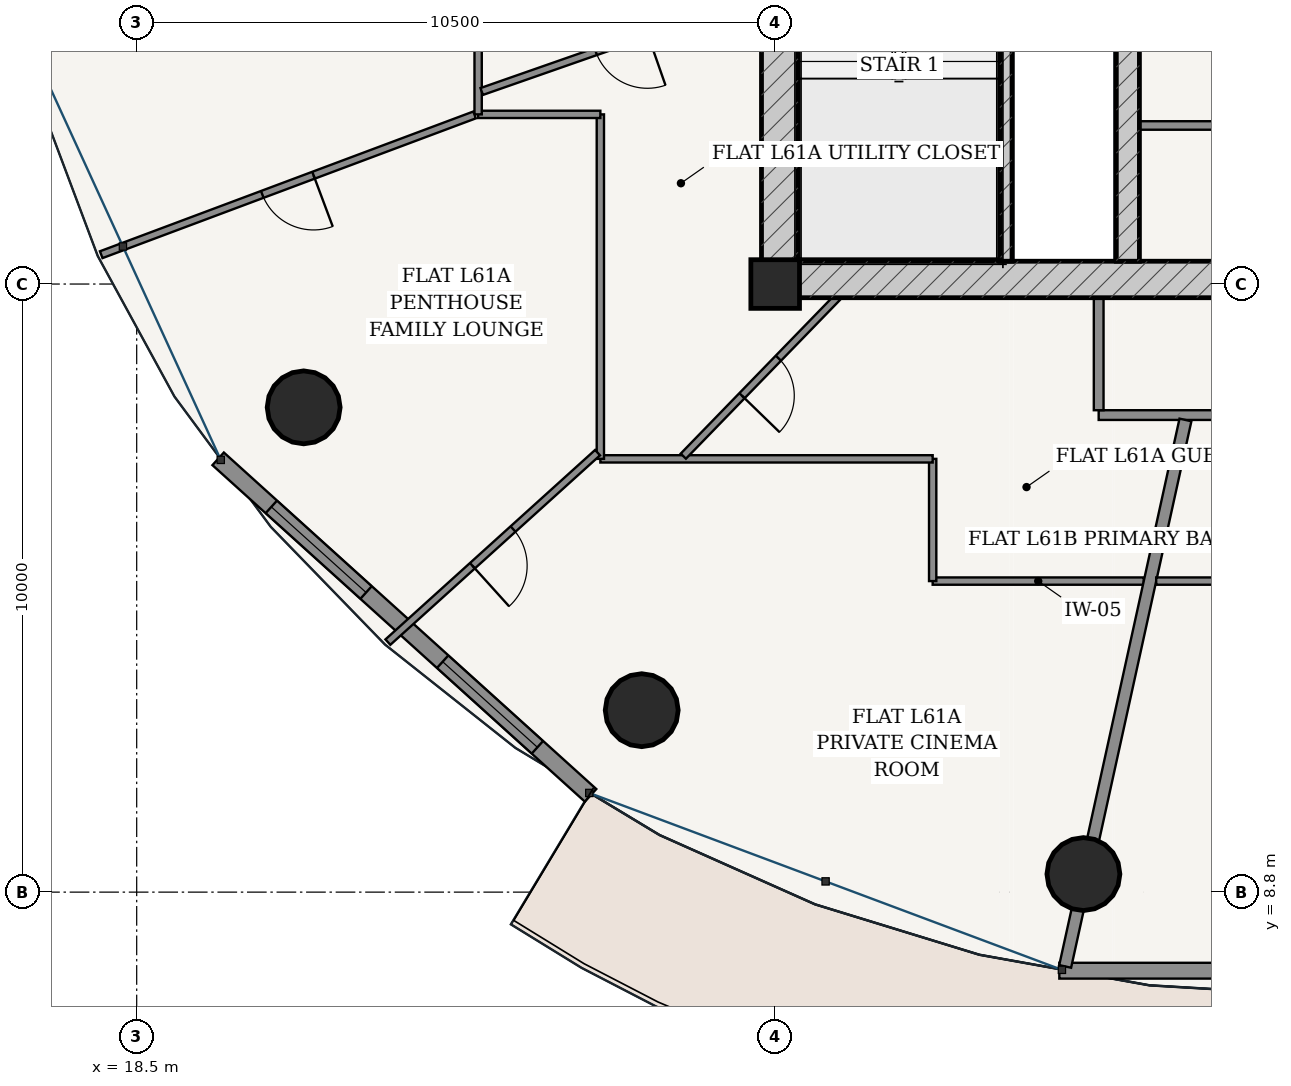
"""IFC4 building model, lengths in metres.
Left out: names, types, materials, properties, quantities, classifications, styles, units other than length and angle.
Written with IfcOpenShell. Run it as: python <this file> out.ifc"""

import sys

from ifc_helpers import new_model, si_unit, direction, frame, frame_2d, origin, origin_2d, place, context, subcontext, project, spatial, rectangle, hollow_circle, extrude, source, transform, mapped, element, fill, save


model = new_model("IFC4")
c1 = context("Model", 3, precision=1e-05, world=origin(), true_north=direction((-0.2419218956, 0.970295726276)))
c2 = subcontext(c1, "Body", "Model", "MODEL_VIEW")
j1 = project(units=[si_unit("LENGTHUNIT", "METRE"), si_unit("PLANEANGLEUNIT", "RADIAN")], contexts=[c1])
p1 = place(None, origin())
s1 = spatial("IfcSite", under=j1, at=p1, CompositionType="ELEMENT")
p2 = place(p1, origin())
s2 = spatial("IfcBuilding", under=s1, at=p2, CompositionType="ELEMENT")
p3 = place(p2, frame((0.0, 0.0, 231.9)))
s3 = spatial("IfcBuildingStorey", under=s2, at=p3, CompositionType="ELEMENT", Elevation=231.9)
p4 = place(p3, frame((29.0, 18.8, 0.0), z_axis=(0.0, 0.0, 1.0), x_axis=(1.0, 0.0, 0.0)))
e1 = element("IfcColumn", 1, at=p4, inside=s3, PredefinedType="COLUMN", context=c2, shape_type="SweptSolid", body=[
    extrude(rectangle(XDim=0.8, YDim=0.8, at=origin_2d()), origin(), (0.0, 0.0, 1.0), 3.7),
])
p5 = place(p3, frame((28.775, 18.875, 0.0), z_axis=(0.0, 0.0, 1.0), x_axis=(1.0, 0.0, 0.0)))
e2 = element("IfcWall", 2, at=p5, inside=s3, PredefinedType="SHEAR", context=c2, shape_type="SweptSolid", body=[
    extrude(rectangle(XDim=18.45, YDim=0.6, at=frame_2d((9.225, 0.0))), origin(), (0.0, 0.0, 1.0), 3.435),
])
p6 = place(p5, frame((8.8, 0.0, 0.0)))
e3 = element("IfcOpeningElement", 3, at=p6, cuts=e2, PredefinedType="OPENING", context=c2, shape_type="SweptSolid", body=[
    extrude(rectangle(XDim=0.85, YDim=2.1, at=frame_2d((0.425, 1.05))), frame((0.0, 0.31, 0.0), z_axis=(0.0, -1.0, 0.0), x_axis=(1.0, 0.0, 0.0)), (0.0, 0.0, 1.0), 0.62),
])
p7 = place(p3, frame((29.075, 19.175, 0.0), z_axis=(0.0, 0.0, 1.0), x_axis=(0.0, 1.0, 0.0)))
e4 = element("IfcWall", 4, at=p7, inside=s3, PredefinedType="SHEAR", context=c2, shape_type="SweptSolid", body=[
    extrude(rectangle(XDim=15.25, YDim=0.6, at=frame_2d((7.625, 0.0))), origin(), (0.0, 0.0, 1.0), 3.435),
])
p8 = place(p7, frame((9.875, 0.0, 0.0)))
e5 = element("IfcOpeningElement", 5, at=p8, cuts=e4, PredefinedType="OPENING", context=c2, shape_type="SweptSolid", body=[
    extrude(rectangle(XDim=1.5, YDim=2.2, at=frame_2d((0.75, 1.1))), frame((0.0, 0.31, 0.0), z_axis=(0.0, -1.0, 0.0), x_axis=(1.0, 0.0, 0.0)), (0.0, 0.0, 1.0), 0.62),
])
p9 = place(p3, frame((32.795, 19.175, 0.0), z_axis=(0.0, 0.0, 1.0), x_axis=(0.0, 1.0, 0.0)))
e6 = element("IfcWall", 6, at=p9, inside=s3, PredefinedType="SOLIDWALL", context=c2, shape_type="SweptSolid", body=[
    extrude(rectangle(XDim=7.375, YDim=0.2, at=frame_2d((3.688, 0.0))), origin(), (0.0, 0.0, 1.0), 3.435),
])
p10 = place(p3, frame((34.8, 19.175, 0.0), z_axis=(0.0, 0.0, 1.0), x_axis=(0.0, 1.0, 0.0)))
e7 = element("IfcWall", 7, at=p10, inside=s3, PredefinedType="SHEAR", context=c2, shape_type="SweptSolid", body=[
    extrude(rectangle(XDim=15.25, YDim=0.38, at=frame_2d((7.625, 0.0))), origin(), (0.0, 0.0, 1.0), 3.435),
])
p11 = place(p10, frame((7.8, 0.0, 0.0)))
e8 = element("IfcOpeningElement", 8, at=p11, cuts=e7, PredefinedType="OPENING", context=c2, shape_type="SweptSolid", body=[
    extrude(rectangle(XDim=1.05, YDim=2.15, at=frame_2d((0.525, 1.075))), frame((0.0, 0.2, 0.0), z_axis=(0.0, -1.0, 0.0), x_axis=(1.0, 0.0, 0.0)), (0.0, 0.0, 1.0), 0.4),
])
for number, where, z_axis, x_axis in (
    (9, (21.246, 16.772, 0.0), (0.0, 0.0, 1.0), (1.0, 0.0, 0.0)),
    (10, (26.805, 11.792, 0.0), (0.0, 0.0, 1.0), (1.0, 0.0, 0.0)),
    (11, (34.069, 9.097, 0.0), (0.0, 0.0, 1.0), (1.0, 0.0, 0.0)),
):
    element("IfcColumn", number, at=place(p3, frame(where, z_axis=z_axis, x_axis=x_axis)), inside=s3, PredefinedType="COLUMN", context=c2, shape_type="SweptSolid", body=[
        extrude(hollow_circle(Radius=0.6, WallThickness=0.038, at=origin_2d()), origin(), (0.0, 0.0, 1.0), 3.7),
    ])
p12 = place(p3, frame((19.84, 15.926, 0.0), z_axis=(0.0, 0.0, 1.0), x_axis=(0.741986838603, -0.670414447443, 0.0)))
e12 = element("IfcWall", 12, at=p12, inside=s3, PredefinedType="SOLIDWALL", context=c2, shape_type="SweptSolid", body=[
    extrude(rectangle(XDim=8.255, YDim=0.28, at=frame_2d((4.127, 0.0))), origin(), (0.0, 0.0, 1.0), 3.435),
])
p13 = place(p12, frame((1.179, 0.0, 0.85)))
e13 = element("IfcOpeningElement", 13, at=p13, cuts=e12, PredefinedType="OPENING", context=c2, shape_type="SweptSolid", body=[
    extrude(rectangle(XDim=2.1, YDim=1.95, at=frame_2d((1.05, 0.975))), frame((0.0, 0.15, 0.0), z_axis=(0.0, -1.0, 0.0), x_axis=(1.0, 0.0, 0.0)), (0.0, 0.0, 1.0), 0.3),
])
p14 = place(p12, frame((4.976, 0.0, 0.85)))
e14 = element("IfcOpeningElement", 14, at=p14, cuts=e12, PredefinedType="OPENING", context=c2, shape_type="SweptSolid", body=[
    extrude(rectangle(XDim=2.1, YDim=1.95, at=frame_2d((1.05, 0.975))), frame((0.0, 0.15, 0.0), z_axis=(0.0, -1.0, 0.0), x_axis=(1.0, 0.0, 0.0)), (0.0, 0.0, 1.0), 0.3),
])
p15 = place(p3, frame((33.673, 7.508, 0.0), z_axis=(0.0, 0.0, 1.0), x_axis=(1.0, 0.0, 0.0)))
e15 = element("IfcWall", 15, at=p15, inside=s3, PredefinedType="SOLIDWALL", context=c2, shape_type="SweptSolid", body=[
    extrude(rectangle(XDim=8.654, YDim=0.26, at=frame_2d((4.327, 0.0))), origin(), (0.0, 0.0, 1.0), 3.435),
])
p16 = place(p15, frame((3.652, 0.0, 0.0)))
e16 = element("IfcOpeningElement", 16, at=p16, cuts=e15, PredefinedType="OPENING", context=c2, shape_type="SweptSolid", body=[
    extrude(rectangle(XDim=1.35, YDim=2.2, at=frame_2d((0.675, 1.1))), frame((0.0, 0.14, 0.0), z_axis=(0.0, -1.0, 0.0), x_axis=(1.0, 0.0, 0.0)), (0.0, 0.0, 1.0), 0.28),
])
p17 = place(p3, frame((34.99, 21.407, 0.0), z_axis=(0.0, 0.0, 1.0), x_axis=(1.0, 0.0, 0.0)))
e17 = element("IfcWall", 17, at=p17, inside=s3, PredefinedType="PARTITIONING", context=c2, shape_type="SweptSolid", body=[
    extrude(rectangle(XDim=6.02, YDim=0.14, at=frame_2d((3.01, 0.0))), origin(), (0.0, 0.0, 1.0), 3.435),
])
p18 = place(p17, frame((2.585, 0.0, 0.0)))
e18 = element("IfcOpeningElement", 18, at=p18, cuts=e17, PredefinedType="OPENING", context=c2, shape_type="SweptSolid", body=[
    extrude(rectangle(XDim=0.85, YDim=2.1, at=frame_2d((0.425, 1.05))), frame((0.0, 0.08, 0.0), z_axis=(0.0, -1.0, 0.0), x_axis=(1.0, 0.0, 0.0)), (0.0, 0.0, 1.0), 0.16),
])
p19 = place(p3, frame((34.32, 16.645, 0.0), z_axis=(0.0, 0.0, 1.0), x_axis=(1.0, 0.0, 0.0)))
e19 = element("IfcWall", 19, at=p19, inside=s3, PredefinedType="PARTITIONING", context=c2, shape_type="SweptSolid", body=[
    extrude(rectangle(XDim=14.835, YDim=0.16, at=frame_2d((7.417, 0.0))), origin(), (0.0, 0.0, 1.0), 2.951),
])
p20 = place(p19, frame((10.135, 0.0, 0.0)))
e20 = element("IfcOpeningElement", 20, at=p20, cuts=e19, PredefinedType="OPENING", context=c2, shape_type="SweptSolid", body=[
    extrude(rectangle(XDim=0.98, YDim=2.2, at=frame_2d((0.49, 1.1))), frame((0.0, 0.09, 0.0), z_axis=(0.0, -1.0, 0.0), x_axis=(1.0, 0.0, 0.0)), (0.0, 0.0, 1.0), 0.18),
])
p21 = place(p3, frame((34.32, 16.725, 0.0), z_axis=(0.0, 0.0, 1.0), x_axis=(0.0, 1.0, 0.0)))
e21 = element("IfcWall", 21, at=p21, inside=s3, PredefinedType="PARTITIONING", context=c2, shape_type="SweptSolid", body=[
    extrude(rectangle(XDim=1.85, YDim=0.16, at=frame_2d((0.925, 0.0))), origin(), (0.0, 0.0, 1.0), 3.435),
])
p22 = place(p3, frame((35.062, 13.915, 0.0), z_axis=(0.0, 0.0, 1.0), x_axis=(-1.0, 0.0, 0.0)))
e22 = element("IfcWall", 22, at=p22, inside=s3, PredefinedType="PARTITIONING", context=c2, shape_type="SweptSolid", body=[
    extrude(rectangle(XDim=3.472, YDim=0.12, at=frame_2d((1.736, 0.0))), origin(), (0.0, 0.0, 1.0), 2.951),
])
p23 = place(p3, frame((31.59, 13.915, 0.0), z_axis=(0.0, 0.0, 1.0), x_axis=(0.0, 1.0, 0.0)))
e23 = element("IfcWall", 23, at=p23, inside=s3, PredefinedType="PARTITIONING", context=c2, shape_type="SweptSolid", body=[
    extrude(rectangle(XDim=2.01, YDim=0.12, at=frame_2d((1.005, 0.0))), origin(), (0.0, 0.0, 1.0), 3.11),
])
p24 = place(p3, frame((31.59, 15.925, 0.0), z_axis=(0.0, 0.0, 1.0), x_axis=(-1.0, 0.0, 0.0)))
e24 = element("IfcWall", 24, at=p24, inside=s3, PredefinedType="PARTITIONING", context=c2, shape_type="SweptSolid", body=[
    extrude(rectangle(XDim=5.465, YDim=0.12, at=frame_2d((2.732, 0.0))), origin(), (0.0, 0.0, 1.0), 2.951),
])
p25 = place(p3, frame((26.125, 15.925, 0.0), z_axis=(0.0, 0.0, 1.0), x_axis=(0.0, 1.0, 0.0)))
e25 = element("IfcWall", 25, at=p25, inside=s3, PredefinedType="PARTITIONING", context=c2, shape_type="SweptSolid", body=[
    extrude(rectangle(XDim=5.665, YDim=0.12, at=frame_2d((2.833, 0.0))), origin(), (0.0, 0.0, 1.0), 2.951),
])
p26 = place(p3, frame((26.125, 21.59, 0.0), z_axis=(0.0, 0.0, 1.0), x_axis=(-1.0, 0.0, 0.0)))
e26 = element("IfcWall", 26, at=p26, inside=s3, PredefinedType="PARTITIONING", context=c2, shape_type="SweptSolid", body=[
    extrude(rectangle(XDim=2.01, YDim=0.12, at=frame_2d((1.005, 0.0))), origin(), (0.0, 0.0, 1.0), 3.11),
])
p27 = place(p3, frame((24.115, 21.59, 0.0), z_axis=(0.0, 0.0, 1.0), x_axis=(0.0, 1.0, 0.0)))
e27 = element("IfcWall", 27, at=p27, inside=s3, PredefinedType="PARTITIONING", context=c2, shape_type="SweptSolid", body=[
    extrude(rectangle(XDim=16.245, YDim=0.12, at=frame_2d((8.123, 0.0))), origin(), (0.0, 0.0, 1.0), 2.951),
])
p28 = place(p27, frame((10.733, 0.0, 0.0)))
e28 = element("IfcOpeningElement", 28, at=p28, cuts=e27, PredefinedType="OPENING", context=c2, shape_type="SweptSolid", body=[
    extrude(rectangle(XDim=0.9, YDim=2.15, at=frame_2d((0.45, 1.075))), frame((0.0, 0.07, 0.0), z_axis=(0.0, -1.0, 0.0), x_axis=(1.0, 0.0, 0.0)), (0.0, 0.0, 1.0), 0.14),
])
p29 = place(p3, frame((24.057, 21.581, 0.0), z_axis=(0.0, 0.0, 1.0), x_axis=(-0.936527968377, -0.350592875637, 0.0)))
e29 = element("IfcWall", 29, at=p29, inside=s3, PredefinedType="PARTITIONING", context=c2, shape_type="SweptSolid", body=[
    extrude(rectangle(XDim=6.556, YDim=0.12, at=frame_2d((3.278, 0.0))), origin(), (0.0, 0.0, 1.0), 2.951),
])
p30 = place(p29, frame((2.828, 0.0, 0.0)))
e30 = element("IfcOpeningElement", 30, at=p30, cuts=e29, PredefinedType="OPENING", context=c2, shape_type="SweptSolid", body=[
    extrude(rectangle(XDim=0.9, YDim=2.15, at=frame_2d((0.45, 1.075))), frame((0.0, 0.07, 0.0), z_axis=(0.0, -1.0, 0.0), x_axis=(1.0, 0.0, 0.0)), (0.0, 0.0, 1.0), 0.14),
])
p31 = place(p3, frame((26.079, 16.027, 0.0), z_axis=(0.0, 0.0, 1.0), x_axis=(-0.741950057395, -0.67045515311, 0.0)))
e31 = element("IfcWall", 31, at=p31, inside=s3, PredefinedType="PARTITIONING", context=c2, shape_type="SweptSolid", body=[
    extrude(rectangle(XDim=4.647, YDim=0.12, at=frame_2d((2.324, 0.0))), origin(), (0.0, 0.0, 1.0), 2.951),
])
p32 = place(p31, frame((1.874, 0.0, 0.0)))
e32 = element("IfcOpeningElement", 32, at=p32, cuts=e31, PredefinedType="OPENING", context=c2, shape_type="SweptSolid", body=[
    extrude(rectangle(XDim=0.9, YDim=2.15, at=frame_2d((0.45, 1.075))), frame((0.0, 0.07, 0.0), z_axis=(0.0, -1.0, 0.0), x_axis=(1.0, 0.0, 0.0)), (0.0, 0.0, 1.0), 0.14),
])
p33 = place(p3, frame((28.775, 23.575, 0.0), z_axis=(0.0, 0.0, 1.0), x_axis=(-0.943974645063, -0.330017983569, 0.0)))
e33 = element("IfcWall", 33, at=p33, inside=s3, PredefinedType="PARTITIONING", context=c2, shape_type="SweptSolid", body=[
    extrude(rectangle(XDim=4.875, YDim=0.12, at=frame_2d((2.437, 0.0))), origin(), (0.0, 0.0, 1.0), 3.11),
])
p34 = place(p33, frame((1.987, 0.0, 0.0)))
e34 = element("IfcOpeningElement", 34, at=p34, cuts=e33, PredefinedType="OPENING", context=c2, shape_type="SweptSolid", body=[
    extrude(rectangle(XDim=0.9, YDim=2.15, at=frame_2d((0.45, 1.075))), frame((0.0, 0.07, 0.0), z_axis=(0.0, -1.0, 0.0), x_axis=(1.0, 0.0, 0.0)), (0.0, 0.0, 1.0), 0.14),
])
p35 = place(p3, frame((30.018, 18.575, 0.0), z_axis=(0.0, 0.0, 1.0), x_axis=(-0.696436677683, -0.717618250867, 0.0)))
e35 = element("IfcWall", 35, at=p35, inside=s3, PredefinedType="PARTITIONING", context=c2, shape_type="SweptSolid", body=[
    extrude(rectangle(XDim=3.631, YDim=0.12, at=frame_2d((1.815, 0.0))), origin(), (0.0, 0.0, 1.0), 2.951),
])
p36 = place(p35, frame((1.385, 0.0, 0.0)))
e36 = element("IfcOpeningElement", 36, at=p36, cuts=e35, PredefinedType="OPENING", context=c2, shape_type="SweptSolid", body=[
    extrude(rectangle(XDim=0.86, YDim=2.15, at=frame_2d((0.43, 1.075))), frame((0.0, 0.07, 0.0), z_axis=(0.0, -1.0, 0.0), x_axis=(1.0, 0.0, 0.0)), (0.0, 0.0, 1.0), 0.14),
])
p37 = place(p3, frame((35.747, 16.565, 0.0), z_axis=(0.0, 0.0, 1.0), x_axis=(-0.214957946814, -0.976623305631, 0.0)))
e37 = element("IfcWall", 37, at=p37, inside=s3, PredefinedType="PARTITIONING", context=c2, shape_type="SweptSolid", body=[
    extrude(rectangle(XDim=9.202, YDim=0.2, at=frame_2d((4.601, 0.0))), origin(), (0.0, 0.0, 1.0), 2.951),
])
p38 = place(p3, frame((51.885, 13.915, 0.0), z_axis=(0.0, 0.0, 1.0), x_axis=(-1.0, 0.0, 0.0)))
e38 = element("IfcWall", 38, at=p38, inside=s3, PredefinedType="PARTITIONING", context=c2, shape_type="SweptSolid", body=[
    extrude(rectangle(XDim=16.619, YDim=0.12, at=frame_2d((8.31, 0.0))), origin(), (0.0, 0.0, 1.0), 2.951),
])
p39 = place(p38, frame((6.797, 0.0, 0.0)))
e39 = element("IfcOpeningElement", 39, at=p39, cuts=e38, PredefinedType="OPENING", context=c2, shape_type="SweptSolid", body=[
    extrude(rectangle(XDim=0.9, YDim=2.15, at=frame_2d((0.45, 1.075))), frame((0.0, 0.07, 0.0), z_axis=(0.0, -1.0, 0.0), x_axis=(1.0, 0.0, 0.0)), (0.0, 0.0, 1.0), 0.14),
])
p40 = place(p38, frame((1.849, 0.0, 0.0)))
e40 = element("IfcOpeningElement", 40, at=p40, cuts=e38, PredefinedType="OPENING", context=c2, shape_type="SweptSolid", body=[
    extrude(rectangle(XDim=0.9, YDim=2.15, at=frame_2d((0.45, 1.075))), frame((0.0, 0.07, 0.0), z_axis=(0.0, -1.0, 0.0), x_axis=(1.0, 0.0, 0.0)), (0.0, 0.0, 1.0), 0.14),
])
m1 = source(origin(), c2, "Body", "SweptSolid", [
    extrude(rectangle(XDim=2.1, YDim=1.95, at=frame_2d((1.05, 0.975))), frame((0.0, 0.03, 0.0), z_axis=(0.0, -1.0, 0.0), x_axis=(1.0, 0.0, 0.0)), (0.0, 0.0, 1.0), 0.06),
])
p41 = place(p13, origin())
e41 = element("IfcWindow", 41, at=p41, inside=s3, PartitioningType="SINGLE_PANEL", PredefinedType="WINDOW", context=c2, shape_type="MappedRepresentation", body=[
    mapped(m1, transform((0.0, 0.0, 0.0), scale=1.0)),
])
fill(e13, e41)
p42 = place(p14, origin())
e42 = element("IfcWindow", 42, at=p42, inside=s3, PartitioningType="SINGLE_PANEL", PredefinedType="WINDOW", context=c2, shape_type="MappedRepresentation", body=[
    mapped(m1, transform((0.0, 0.0, 0.0), scale=1.0)),
])
fill(e14, e42)
m2 = source(origin(), c2, "Body", "SweptSolid", [
    extrude(rectangle(XDim=0.9, YDim=2.15, at=frame_2d((0.45, 1.075))), frame((0.0, 0.025, 0.0), z_axis=(0.0, -1.0, 0.0), x_axis=(1.0, 0.0, 0.0)), (0.0, 0.0, 1.0), 0.05),
])
p43 = place(p34, origin())
e43 = element("IfcDoor", 43, at=p43, inside=s3, OperationType="SINGLE_SWING_LEFT", PredefinedType="DOOR", context=c2, shape_type="MappedRepresentation", body=[
    mapped(m2, transform((0.0, 0.0, 0.0), scale=1.0)),
])
fill(e34, e43)
m3 = source(origin(), c2, "Body", "SweptSolid", [
    extrude(rectangle(XDim=0.86, YDim=2.15, at=frame_2d((0.43, 1.075))), frame((0.0, 0.025, 0.0), z_axis=(0.0, -1.0, 0.0), x_axis=(1.0, 0.0, 0.0)), (0.0, 0.0, 1.0), 0.05),
])
p44 = place(p36, origin())
e44 = element("IfcDoor", 44, at=p44, inside=s3, OperationType="SINGLE_SWING_RIGHT", PredefinedType="DOOR", context=c2, shape_type="MappedRepresentation", body=[
    mapped(m3, transform((0.0, 0.0, 0.0), scale=1.0)),
])
fill(e36, e44)
p45 = place(p30, origin())
e45 = element("IfcDoor", 45, at=p45, inside=s3, OperationType="SINGLE_SWING_LEFT", PredefinedType="DOOR", context=c2, shape_type="MappedRepresentation", body=[
    mapped(m2, transform((0.0, 0.0, 0.0), scale=1.0)),
])
fill(e30, e45)
p46 = place(p32, origin())
e46 = element("IfcDoor", 46, at=p46, inside=s3, OperationType="SINGLE_SWING_RIGHT", PredefinedType="DOOR", context=c2, shape_type="MappedRepresentation", body=[
    mapped(m2, transform((0.0, 0.0, 0.0), scale=1.0)),
])
fill(e32, e46)
save(model, sys.argv[1])
